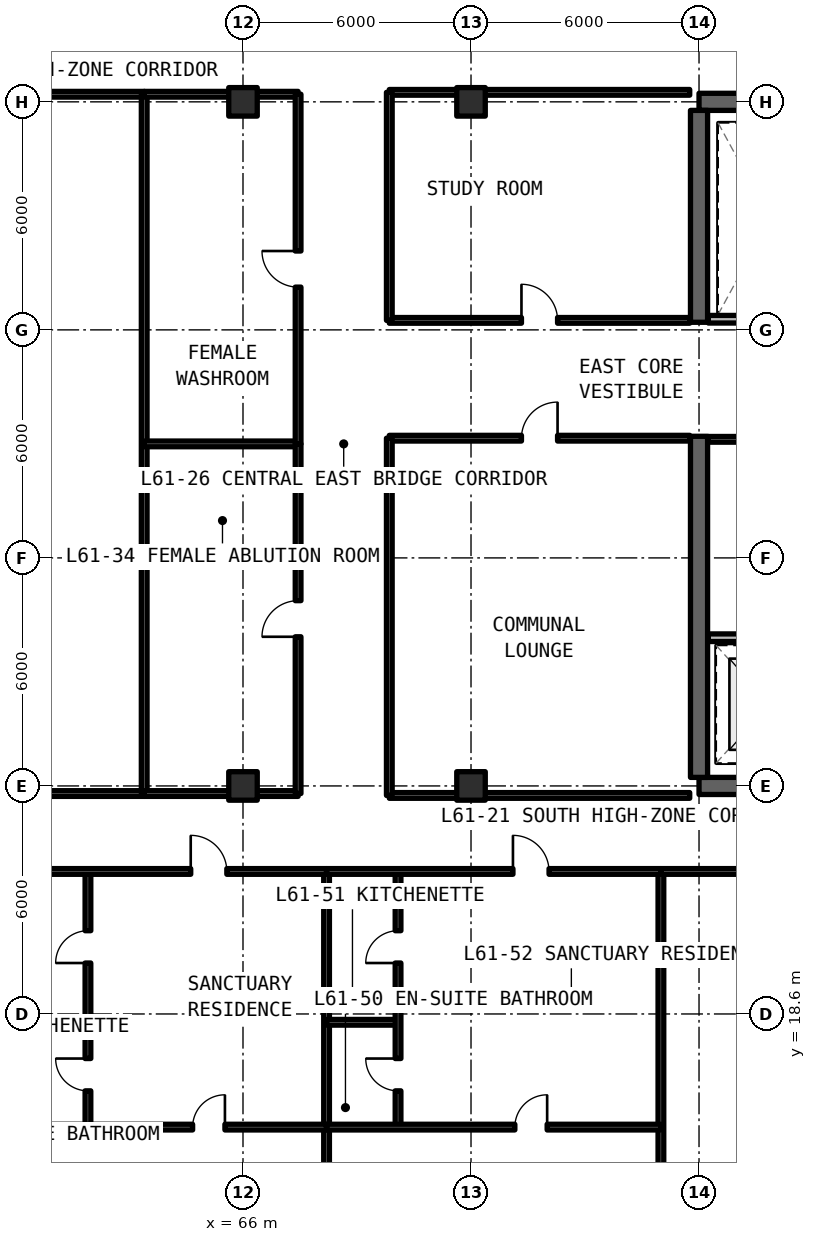
"""IFC4 building model, lengths in metres.
Left out: names, types, materials, properties, quantities, classifications, styles, units other than length and angle.
Written with IfcOpenShell. Run it as: python <this file> out.ifc"""

import sys

from ifc_helpers import new_model, si_unit, direction, frame, frame_2d, origin, origin_2d, place, context, subcontext, project, spatial, rectangle, extrude, element, fill, save


model = new_model("IFC4")
c1 = context("Model", 3, precision=1e-05, world=origin(), true_north=direction((0.0, 1.0)))
c2 = subcontext(c1, "Body", "Model", "MODEL_VIEW")
j1 = project(units=[si_unit("LENGTHUNIT", "METRE"), si_unit("PLANEANGLEUNIT", "RADIAN")], contexts=[c1])
p1 = place(None, origin())
s1 = spatial("IfcSite", under=j1, at=p1, CompositionType="ELEMENT")
p2 = place(p1, origin())
s2 = spatial("IfcBuilding", under=s1, at=p2, CompositionType="ELEMENT")
p3 = place(p2, frame((0.0, 0.0, 219.12)))
s3 = spatial("IfcBuildingStorey", under=s2, at=p3, CompositionType="ELEMENT", Elevation=219.12)
for number, where, z_axis, x_axis in (
    (1, (78.0, 24.6, 0.0), (0.0, 0.0, 1.0), (1.0, 0.0, 0.0)),
    (2, (90.0, 42.6, 0.0), (0.0, 0.0, 1.0), (-1.0, 0.0, 0.0)),
):
    element("IfcWall", number, at=place(p3, frame(where, z_axis=z_axis, x_axis=x_axis)), inside=s3, PredefinedType="SHEAR", context=c2, shape_type="SweptSolid", body=[
        extrude(rectangle(XDim=12.0, YDim=0.45, at=frame_2d((6.0, 0.0))), origin(), (0.0, 0.0, 1.0), 3.63),
    ])
p4 = place(p3, frame((78.0, 24.825, 0.0), z_axis=(0.0, 0.0, 1.0), x_axis=(0.0, 1.0, 0.0)))
e3 = element("IfcWall", 3, at=p4, inside=s3, PredefinedType="SHEAR", context=c2, shape_type="SweptSolid", body=[
    extrude(rectangle(XDim=8.975, YDim=0.45, at=frame_2d((4.488, 0.0))), origin(), (0.0, 0.0, 1.0), 3.63),
])
p5 = place(p3, frame((78.0, 36.8, 0.0), z_axis=(0.0, 0.0, 1.0), x_axis=(0.0, 1.0, 0.0)))
e4 = element("IfcWall", 4, at=p5, inside=s3, PredefinedType="SHEAR", context=c2, shape_type="SweptSolid", body=[
    extrude(rectangle(XDim=5.575, YDim=0.45, at=frame_2d((2.788, 0.0))), origin(), (0.0, 0.0, 1.0), 3.63),
])
for number, where, z_axis, x_axis in (
    (5, (66.0, 24.6, 0.0), (0.0, 0.0, 1.0), (1.0, 0.0, 0.0)),
    (6, (66.0, 42.6, 0.0), (0.0, 0.0, 1.0), (1.0, 0.0, 0.0)),
    (7, (72.0, 24.6, 0.0), (0.0, 0.0, 1.0), (1.0, 0.0, 0.0)),
    (8, (72.0, 42.6, 0.0), (0.0, 0.0, 1.0), (1.0, 0.0, 0.0)),
):
    element("IfcColumn", number, at=place(p3, frame(where, z_axis=z_axis, x_axis=x_axis)), inside=s3, PredefinedType="COLUMN", context=c2, shape_type="SweptSolid", body=[
        extrude(rectangle(XDim=0.75, YDim=0.75, at=origin_2d()), origin(), (0.0, 0.0, 1.0), 3.63),
    ])
p6 = place(p3, frame((78.245, 28.5, 0.0), z_axis=(0.0, 0.0, 1.0), x_axis=(1.0, 0.0, 0.0)))
e9 = element("IfcWall", 9, at=p6, inside=s3, PredefinedType="SOLIDWALL", context=c2, shape_type="SweptSolid", body=[
    extrude(rectangle(XDim=7.585, YDim=0.2, at=frame_2d((3.792, 0.0))), origin(), (0.0, 0.0, 1.0), 2.63),
])
p7 = place(p6, frame((3.555, 0.0, 0.0)))
e10 = element("IfcOpeningElement", 10, at=p7, cuts=e9, PredefinedType="OPENING", context=c2, shape_type="SweptSolid", body=[
    extrude(rectangle(XDim=1.0, YDim=2.15, at=frame_2d((0.5, 1.075))), frame((0.0, 0.11, 0.0), z_axis=(0.0, -1.0, 0.0), x_axis=(1.0, 0.0, 0.0)), (0.0, 0.0, 1.0), 0.22),
])
p8 = place(p3, frame((78.245, 33.72, 0.0), z_axis=(0.0, 0.0, 1.0), x_axis=(1.0, 0.0, 0.0)))
e11 = element("IfcWall", 11, at=p8, inside=s3, PredefinedType="SOLIDWALL", context=c2, shape_type="SweptSolid", body=[
    extrude(rectangle(XDim=3.075, YDim=0.15, at=frame_2d((1.538, 0.0))), origin(), (0.0, 0.0, 1.0), 2.63),
])
p9 = place(p3, frame((78.245, 36.88, 0.0), z_axis=(0.0, 0.0, 1.0), x_axis=(1.0, 0.0, 0.0)))
e12 = element("IfcWall", 12, at=p9, inside=s3, PredefinedType="SOLIDWALL", context=c2, shape_type="SweptSolid", body=[
    extrude(rectangle(XDim=3.075, YDim=0.2, at=frame_2d((1.538, 0.0))), origin(), (0.0, 0.0, 1.0), 2.63),
])
p10 = place(p3, frame((69.85, 24.35, 0.0), z_axis=(0.0, 0.0, 1.0), x_axis=(1.0, 0.0, 0.0)))
e13 = element("IfcWall", 13, at=p10, inside=s3, PredefinedType="SOLIDWALL", context=c2, shape_type="SweptSolid", body=[
    extrude(rectangle(XDim=7.905, YDim=0.15, at=frame_2d((3.952, 0.0))), origin(), (0.0, 0.0, 1.0), 2.63),
])
p11 = place(p3, frame((69.85, 33.75, 0.0), z_axis=(0.0, 0.0, 1.0), x_axis=(1.0, 0.0, 0.0)))
e14 = element("IfcWall", 14, at=p11, inside=s3, PredefinedType="SOLIDWALL", context=c2, shape_type="SweptSolid", body=[
    extrude(rectangle(XDim=7.905, YDim=0.15, at=frame_2d((3.952, 0.0))), origin(), (0.0, 0.0, 1.0), 2.63),
])
p12 = place(p11, frame((3.478, 0.0, 0.0)))
e15 = element("IfcOpeningElement", 15, at=p12, cuts=e14, PredefinedType="OPENING", context=c2, shape_type="SweptSolid", body=[
    extrude(rectangle(XDim=0.95, YDim=2.15, at=frame_2d((0.475, 1.075))), frame((0.0, 0.085, 0.0), z_axis=(0.0, -1.0, 0.0), x_axis=(1.0, 0.0, 0.0)), (0.0, 0.0, 1.0), 0.17),
])
p13 = place(p3, frame((69.85, 24.35, 0.0), z_axis=(0.0, 0.0, 1.0), x_axis=(0.0, 1.0, 0.0)))
e16 = element("IfcWall", 16, at=p13, inside=s3, PredefinedType="SOLIDWALL", context=c2, shape_type="SweptSolid", body=[
    extrude(rectangle(XDim=9.4, YDim=0.15, at=frame_2d((4.7, 0.0))), origin(), (0.0, 0.0, 1.0), 2.63),
])
p14 = place(p3, frame((69.85, 36.85, 0.0), z_axis=(0.0, 0.0, 1.0), x_axis=(1.0, 0.0, 0.0)))
e17 = element("IfcWall", 17, at=p14, inside=s3, PredefinedType="SOLIDWALL", context=c2, shape_type="SweptSolid", body=[
    extrude(rectangle(XDim=7.905, YDim=0.15, at=frame_2d((3.952, 0.0))), origin(), (0.0, 0.0, 1.0), 2.63),
])
p15 = place(p14, frame((3.478, 0.0, 0.0)))
e18 = element("IfcOpeningElement", 18, at=p15, cuts=e17, PredefinedType="OPENING", context=c2, shape_type="SweptSolid", body=[
    extrude(rectangle(XDim=0.95, YDim=2.15, at=frame_2d((0.475, 1.075))), frame((0.0, 0.085, 0.0), z_axis=(0.0, -1.0, 0.0), x_axis=(1.0, 0.0, 0.0)), (0.0, 0.0, 1.0), 0.17),
])
p16 = place(p3, frame((69.85, 42.85, 0.0), z_axis=(0.0, 0.0, 1.0), x_axis=(1.0, 0.0, 0.0)))
e19 = element("IfcWall", 19, at=p16, inside=s3, PredefinedType="SOLIDWALL", context=c2, shape_type="SweptSolid", body=[
    extrude(rectangle(XDim=7.905, YDim=0.15, at=frame_2d((3.952, 0.0))), origin(), (0.0, 0.0, 1.0), 2.63),
])
p17 = place(p3, frame((69.85, 36.85, 0.0), z_axis=(0.0, 0.0, 1.0), x_axis=(0.0, 1.0, 0.0)))
e20 = element("IfcWall", 20, at=p17, inside=s3, PredefinedType="SOLIDWALL", context=c2, shape_type="SweptSolid", body=[
    extrude(rectangle(XDim=6.0, YDim=0.15, at=frame_2d((3.0, 0.0))), origin(), (0.0, 0.0, 1.0), 2.63),
])
p18 = place(p3, frame((50.6, 24.4, 0.0), z_axis=(0.0, 0.0, 1.0), x_axis=(1.0, 0.0, 0.0)))
e21 = element("IfcWall", 21, at=p18, inside=s3, PredefinedType="SOLIDWALL", context=c2, shape_type="SweptSolid", body=[
    extrude(rectangle(XDim=12.8, YDim=0.15, at=frame_2d((6.4, 0.0))), origin(), (0.0, 0.0, 1.0), 2.63),
])
p19 = place(p18, frame((5.7, 0.0, 0.0)))
e22 = element("IfcOpeningElement", 22, at=p19, cuts=e21, PredefinedType="OPENING", context=c2, shape_type="SweptSolid", body=[
    extrude(rectangle(XDim=1.4, YDim=2.15, at=frame_2d((0.7, 1.075))), frame((0.0, 0.085, 0.0), z_axis=(0.0, -1.0, 0.0), x_axis=(1.0, 0.0, 0.0)), (0.0, 0.0, 1.0), 0.17),
])
p20 = place(p3, frame((50.6, 42.8, 0.0), z_axis=(0.0, 0.0, 1.0), x_axis=(1.0, 0.0, 0.0)))
e23 = element("IfcWall", 23, at=p20, inside=s3, PredefinedType="SOLIDWALL", context=c2, shape_type="SweptSolid", body=[
    extrude(rectangle(XDim=12.8, YDim=0.15, at=frame_2d((6.4, 0.0))), origin(), (0.0, 0.0, 1.0), 2.63),
])
p21 = place(p3, frame((63.4, 24.4, 0.0), z_axis=(0.0, 0.0, 1.0), x_axis=(0.0, 1.0, 0.0)))
e24 = element("IfcWall", 24, at=p21, inside=s3, PredefinedType="SOLIDWALL", context=c2, shape_type="SweptSolid", body=[
    extrude(rectangle(XDim=18.4, YDim=0.15, at=frame_2d((9.2, 0.0))), origin(), (0.0, 0.0, 1.0), 2.63),
])
for number, where, z_axis, x_axis in (
    (25, (63.4, 24.4, 0.0), (0.0, 0.0, 1.0), (1.0, 0.0, 0.0)),
    (26, (63.4, 33.6, 0.0), (0.0, 0.0, 1.0), (1.0, 0.0, 0.0)),
):
    element("IfcWall", number, at=place(p3, frame(where, z_axis=z_axis, x_axis=x_axis)), inside=s3, PredefinedType="SOLIDWALL", context=c2, shape_type="SweptSolid", body=[
        extrude(rectangle(XDim=4.05, YDim=0.15, at=frame_2d((2.025, 0.0))), origin(), (0.0, 0.0, 1.0), 2.63),
    ])
p22 = place(p3, frame((67.45, 24.4, 0.0), z_axis=(0.0, 0.0, 1.0), x_axis=(0.0, 1.0, 0.0)))
e27 = element("IfcWall", 27, at=p22, inside=s3, PredefinedType="SOLIDWALL", context=c2, shape_type="SweptSolid", body=[
    extrude(rectangle(XDim=9.2, YDim=0.15, at=frame_2d((4.6, 0.0))), origin(), (0.0, 0.0, 1.0), 2.63),
])
p23 = place(p22, frame((4.125, 0.0, 0.0)))
e28 = element("IfcOpeningElement", 28, at=p23, cuts=e27, PredefinedType="OPENING", context=c2, shape_type="SweptSolid", body=[
    extrude(rectangle(XDim=0.95, YDim=2.15, at=frame_2d((0.475, 1.075))), frame((0.0, 0.085, 0.0), z_axis=(0.0, -1.0, 0.0), x_axis=(1.0, 0.0, 0.0)), (0.0, 0.0, 1.0), 0.17),
])
p24 = place(p3, frame((63.4, 42.8, 0.0), z_axis=(0.0, 0.0, 1.0), x_axis=(1.0, 0.0, 0.0)))
e29 = element("IfcWall", 29, at=p24, inside=s3, PredefinedType="SOLIDWALL", context=c2, shape_type="SweptSolid", body=[
    extrude(rectangle(XDim=4.05, YDim=0.15, at=frame_2d((2.025, 0.0))), origin(), (0.0, 0.0, 1.0), 2.63),
])
p25 = place(p3, frame((67.45, 33.6, 0.0), z_axis=(0.0, 0.0, 1.0), x_axis=(0.0, 1.0, 0.0)))
e30 = element("IfcWall", 30, at=p25, inside=s3, PredefinedType="SOLIDWALL", context=c2, shape_type="SweptSolid", body=[
    extrude(rectangle(XDim=9.2, YDim=0.15, at=frame_2d((4.6, 0.0))), origin(), (0.0, 0.0, 1.0), 2.63),
])
p26 = place(p25, frame((4.125, 0.0, 0.0)))
e31 = element("IfcOpeningElement", 31, at=p26, cuts=e30, PredefinedType="OPENING", context=c2, shape_type="SweptSolid", body=[
    extrude(rectangle(XDim=0.95, YDim=2.15, at=frame_2d((0.475, 1.075))), frame((0.0, 0.085, 0.0), z_axis=(0.0, -1.0, 0.0), x_axis=(1.0, 0.0, 0.0)), (0.0, 0.0, 1.0), 0.17),
])
p27 = place(p3, frame((68.199, 12.27, 0.0), z_axis=(0.0, 0.0, 1.0), x_axis=(0.0, 1.0, 0.0)))
e32 = element("IfcWall", 32, at=p27, inside=s3, PredefinedType="SOLIDWALL", context=c2, shape_type="SweptSolid", body=[
    extrude(rectangle(XDim=10.08, YDim=0.15, at=frame_2d((5.04, 0.0))), origin(), (0.0, 0.0, 1.0), 2.63),
])
p28 = place(p3, frame((59.401, 18.381, 0.0), z_axis=(0.0, 0.0, 1.0), x_axis=(1.0, 0.0, 0.0)))
e33 = element("IfcWall", 33, at=p28, inside=s3, PredefinedType="PARTITIONING", context=c2, shape_type="SweptSolid", body=[
    extrude(rectangle(XDim=2.519, YDim=0.15, at=frame_2d((1.259, 0.0))), origin(), (0.0, 0.0, 1.0), 2.63),
])
p29 = place(p3, frame((61.92, 15.623, 0.0), z_axis=(0.0, 0.0, 1.0), x_axis=(0.0, 1.0, 0.0)))
e34 = element("IfcWall", 34, at=p29, inside=s3, PredefinedType="PARTITIONING", context=c2, shape_type="SweptSolid", body=[
    extrude(rectangle(XDim=6.727, YDim=0.15, at=frame_2d((3.364, 0.0))), origin(), (0.0, 0.0, 1.0), 2.63),
])
p30 = place(p29, frame((0.954, 0.0, 0.0)))
e35 = element("IfcOpeningElement", 35, at=p30, cuts=e34, PredefinedType="OPENING", context=c2, shape_type="SweptSolid", body=[
    extrude(rectangle(XDim=0.85, YDim=2.1, at=frame_2d((0.425, 1.05))), frame((0.0, 0.085, 0.0), z_axis=(0.0, -1.0, 0.0), x_axis=(1.0, 0.0, 0.0)), (0.0, 0.0, 1.0), 0.17),
])
p31 = place(p29, frame((4.318, 0.0, 0.0)))
e36 = element("IfcOpeningElement", 36, at=p31, cuts=e34, PredefinedType="OPENING", context=c2, shape_type="SweptSolid", body=[
    extrude(rectangle(XDim=0.85, YDim=2.1, at=frame_2d((0.425, 1.05))), frame((0.0, 0.085, 0.0), z_axis=(0.0, -1.0, 0.0), x_axis=(1.0, 0.0, 0.0)), (0.0, 0.0, 1.0), 0.17),
])
p32 = place(p3, frame((59.401, 15.623, 0.0), z_axis=(0.0, 0.0, 1.0), x_axis=(1.0, 0.0, 0.0)))
e37 = element("IfcWall", 37, at=p32, inside=s3, PredefinedType="PARTITIONING", context=c2, shape_type="SweptSolid", body=[
    extrude(rectangle(XDim=8.798, YDim=0.15, at=frame_2d((4.399, 0.0))), origin(), (0.0, 0.0, 1.0), 2.63),
])
p33 = place(p32, frame((5.273, 0.0, 0.0)))
e38 = element("IfcOpeningElement", 38, at=p33, cuts=e37, PredefinedType="OPENING", context=c2, shape_type="SweptSolid", body=[
    extrude(rectangle(XDim=0.85, YDim=2.1, at=frame_2d((0.425, 1.05))), frame((0.0, 0.085, 0.0), z_axis=(0.0, -1.0, 0.0), x_axis=(1.0, 0.0, 0.0)), (0.0, 0.0, 1.0), 0.17),
])
p34 = place(p3, frame((59.401, 22.35, 0.0), z_axis=(0.0, 0.0, 1.0), x_axis=(1.0, 0.0, 0.0)))
e39 = element("IfcWall", 39, at=p34, inside=s3, PredefinedType="SOLIDWALL", context=c2, shape_type="SweptSolid", body=[
    extrude(rectangle(XDim=8.798, YDim=0.15, at=frame_2d((4.399, 0.0))), origin(), (0.0, 0.0, 1.0), 2.63),
])
p35 = place(p34, frame((5.223, 0.0, 0.0)))
e40 = element("IfcOpeningElement", 40, at=p35, cuts=e39, PredefinedType="OPENING", context=c2, shape_type="SweptSolid", body=[
    extrude(rectangle(XDim=0.95, YDim=2.15, at=frame_2d((0.475, 1.075))), frame((0.0, 0.085, 0.0), z_axis=(0.0, -1.0, 0.0), x_axis=(1.0, 0.0, 0.0)), (0.0, 0.0, 1.0), 0.17),
])
p36 = place(p3, frame((76.997, 12.27, 0.0), z_axis=(0.0, 0.0, 1.0), x_axis=(0.0, 1.0, 0.0)))
e41 = element("IfcWall", 41, at=p36, inside=s3, PredefinedType="SOLIDWALL", context=c2, shape_type="SweptSolid", body=[
    extrude(rectangle(XDim=10.08, YDim=0.15, at=frame_2d((5.04, 0.0))), origin(), (0.0, 0.0, 1.0), 2.63),
])
p37 = place(p3, frame((68.199, 18.381, 0.0), z_axis=(0.0, 0.0, 1.0), x_axis=(1.0, 0.0, 0.0)))
e42 = element("IfcWall", 42, at=p37, inside=s3, PredefinedType="PARTITIONING", context=c2, shape_type="SweptSolid", body=[
    extrude(rectangle(XDim=1.881, YDim=0.15, at=frame_2d((0.94, 0.0))), origin(), (0.0, 0.0, 1.0), 2.63),
])
p38 = place(p3, frame((70.08, 15.623, 0.0), z_axis=(0.0, 0.0, 1.0), x_axis=(0.0, 1.0, 0.0)))
e43 = element("IfcWall", 43, at=p38, inside=s3, PredefinedType="PARTITIONING", context=c2, shape_type="SweptSolid", body=[
    extrude(rectangle(XDim=6.727, YDim=0.15, at=frame_2d((3.364, 0.0))), origin(), (0.0, 0.0, 1.0), 2.63),
])
p39 = place(p38, frame((0.954, 0.0, 0.0)))
e44 = element("IfcOpeningElement", 44, at=p39, cuts=e43, PredefinedType="OPENING", context=c2, shape_type="SweptSolid", body=[
    extrude(rectangle(XDim=0.85, YDim=2.1, at=frame_2d((0.425, 1.05))), frame((0.0, 0.085, 0.0), z_axis=(0.0, -1.0, 0.0), x_axis=(1.0, 0.0, 0.0)), (0.0, 0.0, 1.0), 0.17),
])
p40 = place(p38, frame((4.318, 0.0, 0.0)))
e45 = element("IfcOpeningElement", 45, at=p40, cuts=e43, PredefinedType="OPENING", context=c2, shape_type="SweptSolid", body=[
    extrude(rectangle(XDim=0.85, YDim=2.1, at=frame_2d((0.425, 1.05))), frame((0.0, 0.085, 0.0), z_axis=(0.0, -1.0, 0.0), x_axis=(1.0, 0.0, 0.0)), (0.0, 0.0, 1.0), 0.17),
])
p41 = place(p3, frame((68.199, 15.623, 0.0), z_axis=(0.0, 0.0, 1.0), x_axis=(1.0, 0.0, 0.0)))
e46 = element("IfcWall", 46, at=p41, inside=s3, PredefinedType="PARTITIONING", context=c2, shape_type="SweptSolid", body=[
    extrude(rectangle(XDim=8.798, YDim=0.15, at=frame_2d((4.399, 0.0))), origin(), (0.0, 0.0, 1.0), 2.63),
])
p42 = place(p41, frame((4.954, 0.0, 0.0)))
e47 = element("IfcOpeningElement", 47, at=p42, cuts=e46, PredefinedType="OPENING", context=c2, shape_type="SweptSolid", body=[
    extrude(rectangle(XDim=0.85, YDim=2.1, at=frame_2d((0.425, 1.05))), frame((0.0, 0.085, 0.0), z_axis=(0.0, -1.0, 0.0), x_axis=(1.0, 0.0, 0.0)), (0.0, 0.0, 1.0), 0.17),
])
p43 = place(p3, frame((68.199, 22.35, 0.0), z_axis=(0.0, 0.0, 1.0), x_axis=(1.0, 0.0, 0.0)))
e48 = element("IfcWall", 48, at=p43, inside=s3, PredefinedType="SOLIDWALL", context=c2, shape_type="SweptSolid", body=[
    extrude(rectangle(XDim=8.798, YDim=0.15, at=frame_2d((4.399, 0.0))), origin(), (0.0, 0.0, 1.0), 2.63),
])
p44 = place(p43, frame((4.904, 0.0, 0.0)))
e49 = element("IfcOpeningElement", 49, at=p44, cuts=e48, PredefinedType="OPENING", context=c2, shape_type="SweptSolid", body=[
    extrude(rectangle(XDim=0.95, YDim=2.15, at=frame_2d((0.475, 1.075))), frame((0.0, 0.085, 0.0), z_axis=(0.0, -1.0, 0.0), x_axis=(1.0, 0.0, 0.0)), (0.0, 0.0, 1.0), 0.17),
])
p45 = place(p3, frame((76.997, 22.35, 0.0), z_axis=(0.0, 0.0, 1.0), x_axis=(1.0, 0.0, 0.0)))
e50 = element("IfcWall", 50, at=p45, inside=s3, PredefinedType="SOLIDWALL", context=c2, shape_type="SweptSolid", body=[
    extrude(rectangle(XDim=9.405, YDim=0.15, at=frame_2d((4.702, 0.0))), origin(), (0.0, 0.0, 1.0), 2.63),
])
p46 = place(p45, frame((4.152, 0.0, 0.0)))
e51 = element("IfcOpeningElement", 51, at=p46, cuts=e50, PredefinedType="OPENING", context=c2, shape_type="SweptSolid", body=[
    extrude(rectangle(XDim=1.1, YDim=2.15, at=frame_2d((0.55, 1.075))), frame((0.0, 0.085, 0.0), z_axis=(0.0, -1.0, 0.0), x_axis=(1.0, 0.0, 0.0)), (0.0, 0.0, 1.0), 0.17),
])
p47 = place(p12, origin())
e52 = element("IfcDoor", 52, at=p47, inside=s3, OperationType="SINGLE_SWING_RIGHT", PredefinedType="DOOR", context=c2, shape_type="SweptSolid", body=[
    extrude(rectangle(XDim=0.95, YDim=2.15, at=frame_2d((0.475, 1.075))), frame((0.0, 0.025, 0.0), z_axis=(0.0, -1.0, 0.0), x_axis=(1.0, 0.0, 0.0)), (0.0, 0.0, 1.0), 0.05),
])
fill(e15, e52)
p48 = place(p15, origin())
e53 = element("IfcDoor", 53, at=p48, inside=s3, OperationType="SINGLE_SWING_LEFT", PredefinedType="DOOR", context=c2, shape_type="SweptSolid", body=[
    extrude(rectangle(XDim=0.95, YDim=2.15, at=frame_2d((0.475, 1.075))), frame((0.0, 0.025, 0.0), z_axis=(0.0, -1.0, 0.0), x_axis=(1.0, 0.0, 0.0)), (0.0, 0.0, 1.0), 0.05),
])
fill(e18, e53)
p49 = place(p23, origin())
e54 = element("IfcDoor", 54, at=p49, inside=s3, OperationType="SINGLE_SWING_LEFT", PredefinedType="DOOR", context=c2, shape_type="SweptSolid", body=[
    extrude(rectangle(XDim=0.95, YDim=2.15, at=frame_2d((0.475, 1.075))), frame((0.0, 0.025, 0.0), z_axis=(0.0, -1.0, 0.0), x_axis=(1.0, 0.0, 0.0)), (0.0, 0.0, 1.0), 0.05),
])
fill(e28, e54)
p50 = place(p26, origin())
e55 = element("IfcDoor", 55, at=p50, inside=s3, OperationType="SINGLE_SWING_RIGHT", PredefinedType="DOOR", context=c2, shape_type="SweptSolid", body=[
    extrude(rectangle(XDim=0.95, YDim=2.15, at=frame_2d((0.475, 1.075))), frame((0.0, 0.025, 0.0), z_axis=(0.0, -1.0, 0.0), x_axis=(1.0, 0.0, 0.0)), (0.0, 0.0, 1.0), 0.05),
])
fill(e31, e55)
p51 = place(p30, origin())
e56 = element("IfcDoor", 56, at=p51, inside=s3, OperationType="SINGLE_SWING_RIGHT", PredefinedType="DOOR", context=c2, shape_type="SweptSolid", body=[
    extrude(rectangle(XDim=0.85, YDim=2.1, at=frame_2d((0.425, 1.05))), frame((0.0, 0.025, 0.0), z_axis=(0.0, -1.0, 0.0), x_axis=(1.0, 0.0, 0.0)), (0.0, 0.0, 1.0), 0.05),
])
fill(e35, e56)
p52 = place(p31, origin())
e57 = element("IfcDoor", 57, at=p52, inside=s3, OperationType="SINGLE_SWING_LEFT", PredefinedType="DOOR", context=c2, shape_type="SweptSolid", body=[
    extrude(rectangle(XDim=0.85, YDim=2.1, at=frame_2d((0.425, 1.05))), frame((0.0, 0.025, 0.0), z_axis=(0.0, -1.0, 0.0), x_axis=(1.0, 0.0, 0.0)), (0.0, 0.0, 1.0), 0.05),
])
fill(e36, e57)
p53 = place(p33, origin())
e58 = element("IfcDoor", 58, at=p53, inside=s3, OperationType="SINGLE_SWING_RIGHT", PredefinedType="DOOR", context=c2, shape_type="SweptSolid", body=[
    extrude(rectangle(XDim=0.85, YDim=2.1, at=frame_2d((0.425, 1.05))), frame((0.0, 0.025, 0.0), z_axis=(0.0, -1.0, 0.0), x_axis=(1.0, 0.0, 0.0)), (0.0, 0.0, 1.0), 0.05),
])
fill(e38, e58)
p54 = place(p35, origin())
e59 = element("IfcDoor", 59, at=p54, inside=s3, OperationType="SINGLE_SWING_LEFT", PredefinedType="DOOR", context=c2, shape_type="SweptSolid", body=[
    extrude(rectangle(XDim=0.95, YDim=2.15, at=frame_2d((0.475, 1.075))), frame((0.0, 0.025, 0.0), z_axis=(0.0, -1.0, 0.0), x_axis=(1.0, 0.0, 0.0)), (0.0, 0.0, 1.0), 0.05),
])
fill(e40, e59)
p55 = place(p39, origin())
e60 = element("IfcDoor", 60, at=p55, inside=s3, OperationType="SINGLE_SWING_RIGHT", PredefinedType="DOOR", context=c2, shape_type="SweptSolid", body=[
    extrude(rectangle(XDim=0.85, YDim=2.1, at=frame_2d((0.425, 1.05))), frame((0.0, 0.025, 0.0), z_axis=(0.0, -1.0, 0.0), x_axis=(1.0, 0.0, 0.0)), (0.0, 0.0, 1.0), 0.05),
])
fill(e44, e60)
p56 = place(p40, origin())
e61 = element("IfcDoor", 61, at=p56, inside=s3, OperationType="SINGLE_SWING_LEFT", PredefinedType="DOOR", context=c2, shape_type="SweptSolid", body=[
    extrude(rectangle(XDim=0.85, YDim=2.1, at=frame_2d((0.425, 1.05))), frame((0.0, 0.025, 0.0), z_axis=(0.0, -1.0, 0.0), x_axis=(1.0, 0.0, 0.0)), (0.0, 0.0, 1.0), 0.05),
])
fill(e45, e61)
p57 = place(p42, origin())
e62 = element("IfcDoor", 62, at=p57, inside=s3, OperationType="SINGLE_SWING_RIGHT", PredefinedType="DOOR", context=c2, shape_type="SweptSolid", body=[
    extrude(rectangle(XDim=0.85, YDim=2.1, at=frame_2d((0.425, 1.05))), frame((0.0, 0.025, 0.0), z_axis=(0.0, -1.0, 0.0), x_axis=(1.0, 0.0, 0.0)), (0.0, 0.0, 1.0), 0.05),
])
fill(e47, e62)
p58 = place(p44, origin())
e63 = element("IfcDoor", 63, at=p58, inside=s3, OperationType="SINGLE_SWING_LEFT", PredefinedType="DOOR", context=c2, shape_type="SweptSolid", body=[
    extrude(rectangle(XDim=0.95, YDim=2.15, at=frame_2d((0.475, 1.075))), frame((0.0, 0.025, 0.0), z_axis=(0.0, -1.0, 0.0), x_axis=(1.0, 0.0, 0.0)), (0.0, 0.0, 1.0), 0.05),
])
fill(e49, e63)
save(model, sys.argv[1])
